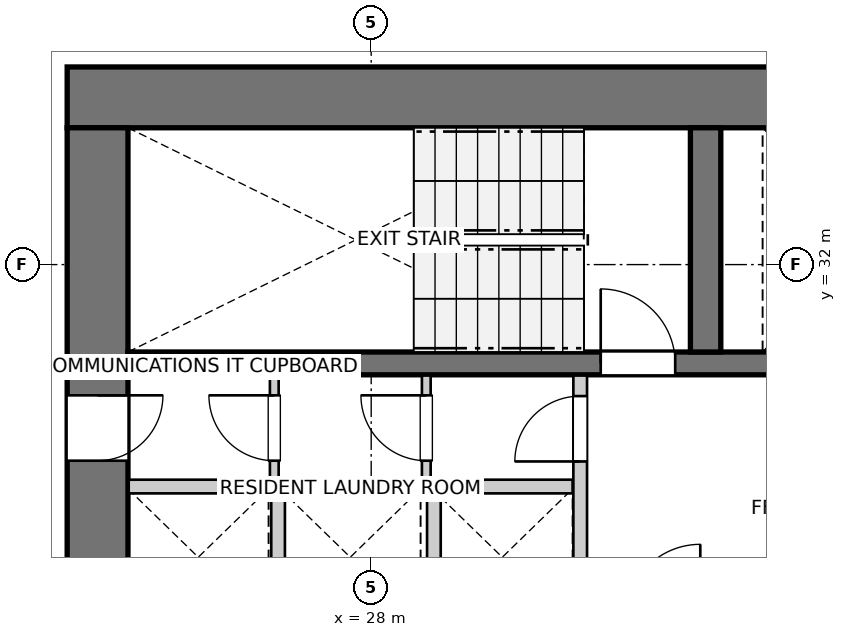
"""IFC4 building model, lengths in metres.
Left out: names, types, materials, properties, quantities, classifications, styles, units other than length and angle.
Written with IfcOpenShell. Run it as: python <this file> out.ifc"""

import sys

from ifc_helpers import new_model, si_unit, direction, frame, frame_2d, origin, place, context, subcontext, project, spatial, rectangle, extrude, source, transform, mapped, element, fill, save


model = new_model("IFC4")
c1 = context("Model", 3, precision=1e-05, world=origin(), true_north=direction((0.0, 1.0)))
c2 = subcontext(c1, "Body", "Model", "MODEL_VIEW")
j1 = project(units=[si_unit("LENGTHUNIT", "METRE"), si_unit("PLANEANGLEUNIT", "RADIAN")], contexts=[c1])
p1 = place(None, origin())
s1 = spatial("IfcSite", under=j1, at=p1, CompositionType="ELEMENT")
p2 = place(p1, origin())
s2 = spatial("IfcBuilding", under=s1, at=p2, CompositionType="ELEMENT")
p3 = place(p2, frame((0.0, 0.0, 55.8)))
s3 = spatial("IfcBuildingStorey", under=s2, at=p3, CompositionType="ELEMENT", Elevation=55.8)
p4 = place(p3, frame((36.7, 34.2, 0.0), z_axis=(0.0, 0.0, 1.0), x_axis=(-1.0, 0.0, 0.0)))
e1 = element("IfcWall", 1, at=p4, inside=s3, PredefinedType="SHEAR", context=c2, shape_type="SweptSolid", body=[
    extrude(rectangle(XDim=12.7, YDim=0.8, at=frame_2d((6.35, 0.0))), origin(), (0.0, 0.0, 1.0), 2.94),
])
p5 = place(p3, frame((24.4, 33.8, 0.0), z_axis=(0.0, 0.0, 1.0), x_axis=(0.0, -1.0, 0.0)))
e2 = element("IfcWall", 2, at=p5, inside=s3, PredefinedType="SHEAR", context=c2, shape_type="SweptSolid", body=[
    extrude(rectangle(XDim=15.6, YDim=0.8, at=frame_2d((7.8, 0.0))), origin(), (0.0, 0.0, 1.0), 2.94),
])
p6 = place(p5, frame((7.05, 0.0, 0.0)))
e3 = element("IfcOpeningElement", 3, at=p6, cuts=e2, PredefinedType="OPENING", context=c2, shape_type="SweptSolid", body=[
    extrude(rectangle(XDim=1.5, YDim=2.15, at=frame_2d((0.75, 1.075))), frame((0.0, 0.41, 0.0), z_axis=(0.0, -1.0, 0.0), x_axis=(1.0, 0.0, 0.0)), (0.0, 0.0, 1.0), 0.82),
])
p7 = place(p5, frame((3.52, 0.0, 0.0)))
e4 = element("IfcOpeningElement", 4, at=p7, cuts=e2, PredefinedType="OPENING", context=c2, shape_type="SweptSolid", body=[
    extrude(rectangle(XDim=0.86, YDim=2.05, at=frame_2d((0.43, 1.025))), frame((0.0, 0.41, 0.0), z_axis=(0.0, -1.0, 0.0), x_axis=(1.0, 0.0, 0.0)), (0.0, 0.0, 1.0), 0.82),
])
p8 = place(p5, frame((11.22, 0.0, 0.0)))
e5 = element("IfcOpeningElement", 5, at=p8, cuts=e2, PredefinedType="OPENING", context=c2, shape_type="SweptSolid", body=[
    extrude(rectangle(XDim=0.86, YDim=2.05, at=frame_2d((0.43, 1.025))), frame((0.0, 0.41, 0.0), z_axis=(0.0, -1.0, 0.0), x_axis=(1.0, 0.0, 0.0)), (0.0, 0.0, 1.0), 0.82),
])
p9 = place(p3, frame((24.8, 30.7, 0.0), z_axis=(0.0, 0.0, 1.0), x_axis=(1.0, 0.0, 0.0)))
e6 = element("IfcWall", 6, at=p9, inside=s3, PredefinedType="SHEAR", context=c2, shape_type="SweptSolid", body=[
    extrude(rectangle(XDim=11.1, YDim=0.3, at=frame_2d((5.55, 0.0))), origin(), (0.0, 0.0, 1.0), 2.94),
])
p10 = place(p9, frame((6.22, 0.0, 0.0)))
e7 = element("IfcOpeningElement", 7, at=p10, cuts=e6, PredefinedType="OPENING", context=c2, shape_type="SweptSolid", body=[
    extrude(rectangle(XDim=0.98, YDim=2.15, at=frame_2d((0.49, 1.075))), frame((0.0, 0.16, 0.0), z_axis=(0.0, -1.0, 0.0), x_axis=(1.0, 0.0, 0.0)), (0.0, 0.0, 1.0), 0.32),
])
p11 = place(p9, frame((9.15, 0.0, 0.0)))
e8 = element("IfcOpeningElement", 8, at=p11, cuts=e6, PredefinedType="OPENING", context=c2, shape_type="SweptSolid", body=[
    extrude(rectangle(XDim=1.15, YDim=2.15, at=frame_2d((0.575, 1.075))), frame((0.0, 0.16, 0.0), z_axis=(0.0, -1.0, 0.0), x_axis=(1.0, 0.0, 0.0)), (0.0, 0.0, 1.0), 0.32),
])
p12 = place(p3, frame((32.4, 30.85, 0.0), z_axis=(0.0, 0.0, 1.0), x_axis=(0.0, 1.0, 0.0)))
e9 = element("IfcWall", 9, at=p12, inside=s3, PredefinedType="SHEAR", context=c2, shape_type="SweptSolid", body=[
    extrude(rectangle(XDim=2.95, YDim=0.4, at=frame_2d((1.475, 0.0))), origin(), (0.0, 0.0, 1.0), 2.94),
])
p13 = place(p3, frame((30.75, 27.43, 0.0), z_axis=(0.0, 0.0, 1.0), x_axis=(0.0, 1.0, 0.0)))
e10 = element("IfcWall", 10, at=p13, inside=s3, PredefinedType="PARTITIONING", context=c2, shape_type="SweptSolid", body=[
    extrude(rectangle(XDim=3.11, YDim=0.18, at=frame_2d((1.555, 0.0))), origin(), (0.0, 0.0, 1.0), 2.94),
])
p14 = place(p13, frame((1.98, 0.0, 0.0)))
e11 = element("IfcOpeningElement", 11, at=p14, cuts=e10, PredefinedType="OPENING", context=c2, shape_type="SweptSolid", body=[
    extrude(rectangle(XDim=0.86, YDim=2.05, at=frame_2d((0.43, 1.025))), frame((0.0, 0.1, 0.0), z_axis=(0.0, -1.0, 0.0), x_axis=(1.0, 0.0, 0.0)), (0.0, 0.0, 1.0), 0.2),
])
p15 = place(p3, frame((24.81, 29.08, 0.0), z_axis=(0.0, 0.0, 1.0), x_axis=(1.0, 0.0, 0.0)))
e12 = element("IfcWall", 12, at=p15, inside=s3, PredefinedType="PARTITIONING", context=c2, shape_type="SweptSolid", body=[
    extrude(rectangle(XDim=5.84, YDim=0.18, at=frame_2d((2.92, 0.0))), origin(), (0.0, 0.0, 1.0), 2.94),
])
for number, where, z_axis, x_axis in (
    (13, (26.775, 27.2, 0.0), (0.0, 0.0, 1.0), (0.0, 1.0, 0.0)),
    (14, (28.825, 27.2, 0.0), (0.0, 0.0, 1.0), (0.0, 1.0, 0.0)),
):
    element("IfcWall", number, at=place(p3, frame(where, z_axis=z_axis, x_axis=x_axis)), inside=s3, PredefinedType="PARTITIONING", context=c2, shape_type="SweptSolid", body=[
        extrude(rectangle(XDim=1.78, YDim=0.18, at=frame_2d((0.89, 0.0))), origin(), (0.0, 0.0, 1.0), 2.94),
    ])
p16 = place(p3, frame((26.725, 29.16, 0.0), z_axis=(0.0, 0.0, 1.0), x_axis=(0.0, 1.0, 0.0)))
e15 = element("IfcWall", 15, at=p16, inside=s3, PredefinedType="PARTITIONING", context=c2, shape_type="SweptSolid", body=[
    extrude(rectangle(XDim=1.38, YDim=0.115, at=frame_2d((0.69, 0.0))), origin(), (0.0, 0.0, 1.0), 2.94),
])
p17 = place(p16, frame((0.26, 0.0, 0.0)))
e16 = element("IfcOpeningElement", 16, at=p17, cuts=e15, PredefinedType="OPENING", context=c2, shape_type="SweptSolid", body=[
    extrude(rectangle(XDim=0.86, YDim=2.05, at=frame_2d((0.43, 1.025))), frame((0.0, 0.067, 0.0), z_axis=(0.0, -1.0, 0.0), x_axis=(1.0, 0.0, 0.0)), (0.0, 0.0, 1.0), 0.135),
])
p18 = place(p3, frame((28.725, 29.16, 0.0), z_axis=(0.0, 0.0, 1.0), x_axis=(0.0, 1.0, 0.0)))
e17 = element("IfcWall", 17, at=p18, inside=s3, PredefinedType="PARTITIONING", context=c2, shape_type="SweptSolid", body=[
    extrude(rectangle(XDim=1.38, YDim=0.115, at=frame_2d((0.69, 0.0))), origin(), (0.0, 0.0, 1.0), 2.94),
])
p19 = place(p18, frame((0.26, 0.0, 0.0)))
e18 = element("IfcOpeningElement", 18, at=p19, cuts=e17, PredefinedType="OPENING", context=c2, shape_type="SweptSolid", body=[
    extrude(rectangle(XDim=0.86, YDim=2.05, at=frame_2d((0.43, 1.025))), frame((0.0, 0.067, 0.0), z_axis=(0.0, -1.0, 0.0), x_axis=(1.0, 0.0, 0.0)), (0.0, 0.0, 1.0), 0.135),
])
m1 = source(origin(), c2, "Body", "SweptSolid", [
    extrude(rectangle(XDim=0.98, YDim=2.15, at=frame_2d((0.49, 1.075))), frame((0.0, 0.025, 0.0), z_axis=(0.0, -1.0, 0.0), x_axis=(1.0, 0.0, 0.0)), (0.0, 0.0, 1.0), 0.05),
])
p20 = place(p10, origin())
e19 = element("IfcDoor", 19, at=p20, inside=s3, OperationType="SINGLE_SWING_LEFT", PredefinedType="DOOR", context=c2, shape_type="MappedRepresentation", body=[
    mapped(m1, transform((0.0, 0.0, 0.0), x_axis=(1.0, 0.0, 0.0), y_axis=(0.0, 1.0, 0.0), z_axis=(0.0, 0.0, 1.0), scale=1.0)),
])
fill(e7, e19)
m2 = source(origin(), c2, "Body", "SweptSolid", [
    extrude(rectangle(XDim=0.86, YDim=2.05, at=frame_2d((0.43, 1.025))), frame((0.0, 0.025, 0.0), z_axis=(0.0, -1.0, 0.0), x_axis=(1.0, 0.0, 0.0)), (0.0, 0.0, 1.0), 0.05),
])
p21 = place(p7, origin())
e20 = element("IfcDoor", 20, at=p21, inside=s3, OperationType="SINGLE_SWING_LEFT", PredefinedType="DOOR", context=c2, shape_type="MappedRepresentation", body=[
    mapped(m2, transform((0.0, 0.0, 0.0), x_axis=(1.0, 0.0, 0.0), y_axis=(0.0, 1.0, 0.0), z_axis=(0.0, 0.0, 1.0), scale=1.0)),
])
fill(e4, e20)
p22 = place(p14, origin())
e21 = element("IfcDoor", 21, at=p22, inside=s3, OperationType="SINGLE_SWING_LEFT", PredefinedType="DOOR", context=c2, shape_type="MappedRepresentation", body=[
    mapped(m2, transform((0.0, 0.0, 0.0), x_axis=(1.0, 0.0, 0.0), y_axis=(0.0, 1.0, 0.0), z_axis=(0.0, 0.0, 1.0), scale=1.0)),
])
fill(e11, e21)
p23 = place(p17, origin())
e22 = element("IfcDoor", 22, at=p23, inside=s3, OperationType="SINGLE_SWING_RIGHT", PredefinedType="DOOR", context=c2, shape_type="MappedRepresentation", body=[
    mapped(m2, transform((0.0, 0.0, 0.0), x_axis=(1.0, 0.0, 0.0), y_axis=(0.0, 1.0, 0.0), z_axis=(0.0, 0.0, 1.0), scale=1.0)),
])
fill(e16, e22)
p24 = place(p19, origin())
e23 = element("IfcDoor", 23, at=p24, inside=s3, OperationType="SINGLE_SWING_RIGHT", PredefinedType="DOOR", context=c2, shape_type="MappedRepresentation", body=[
    mapped(m2, transform((0.0, 0.0, 0.0), x_axis=(1.0, 0.0, 0.0), y_axis=(0.0, 1.0, 0.0), z_axis=(0.0, 0.0, 1.0), scale=1.0)),
])
fill(e18, e23)
save(model, sys.argv[1])
